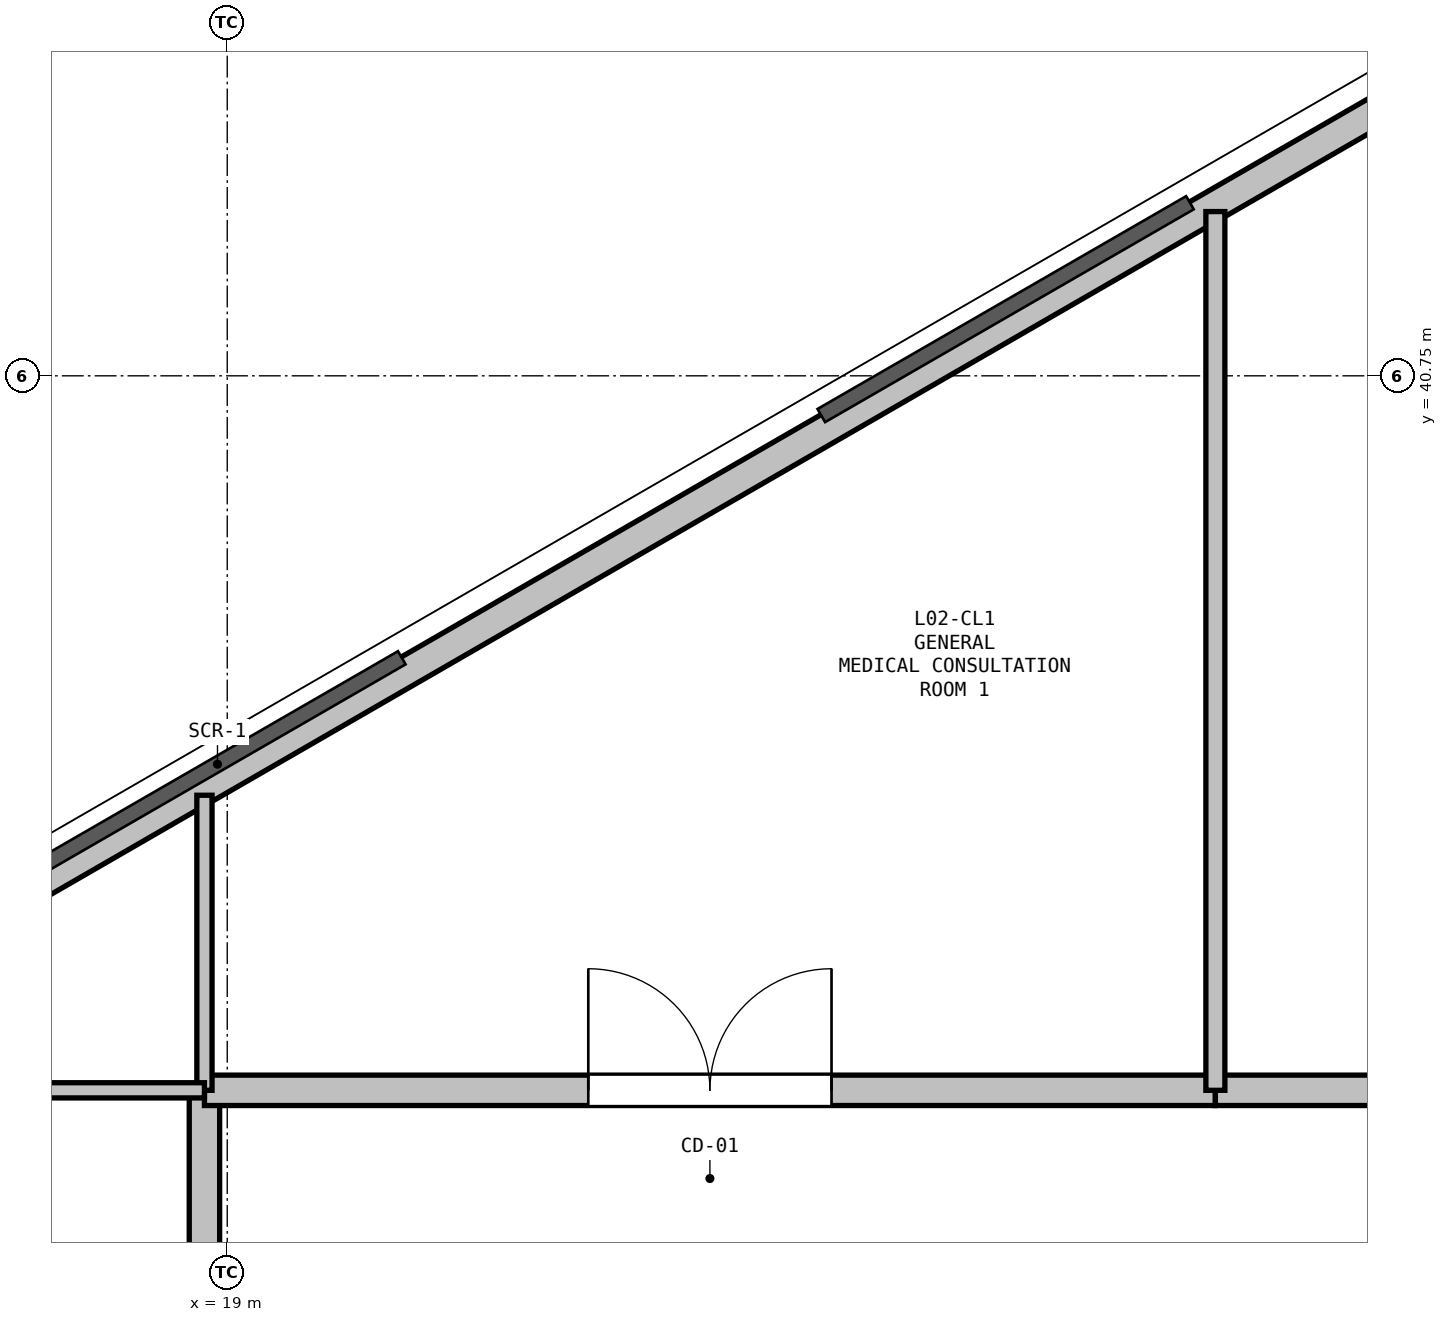
"""IFC4 building model, lengths in metres.
Left out: names, types, materials, properties, quantities, classifications, styles, units other than length and angle.
Written with IfcOpenShell. Run it as: python <this file> out.ifc"""

import sys

from ifc_helpers import new_model, si_unit, direction, frame, frame_2d, origin, place, context, subcontext, project, spatial, rectangle, extrude, element, fill, save


model = new_model("IFC4")
c1 = context("Model", 3, precision=1e-05, world=origin(), true_north=direction((0.0, 1.0)))
c2 = subcontext(c1, "Body", "Model", "MODEL_VIEW")
j1 = project(units=[si_unit("LENGTHUNIT", "METRE"), si_unit("PLANEANGLEUNIT", "RADIAN")], contexts=[c1])
p1 = place(None, origin())
s1 = spatial("IfcSite", under=j1, at=p1, CompositionType="ELEMENT")
p2 = place(p1, origin())
s2 = spatial("IfcBuilding", under=s1, at=p2, CompositionType="ELEMENT")
p3 = place(p2, frame((0.0, 0.0, 9.6)))
s3 = spatial("IfcBuildingStorey", under=s2, at=p3, CompositionType="ELEMENT", Elevation=9.6)
p4 = place(p3, frame((16.39, 36.617, 0.0), z_axis=(0.0, 0.0, 1.0), x_axis=(0.866027351828, 0.499996625875, 0.0)))
e1 = element("IfcWall", 1, at=p4, inside=s3, PredefinedType="PARAPET", context=c2, shape_type="SweptSolid", body=[
    extrude(rectangle(XDim=11.973, YDim=0.2, at=frame_2d((5.987, 0.0))), origin(), (0.0, 0.0, 1.0), 0.2),
])
p5 = place(p3, frame((18.85, 27.2, 0.0), z_axis=(0.0, 0.0, 1.0), x_axis=(0.0, 1.0, 0.0)))
e2 = element("IfcWall", 2, at=p5, inside=s3, PredefinedType="PARTITIONING", context=c2, shape_type="SweptSolid", body=[
    extrude(rectangle(XDim=8.85, YDim=0.2, at=frame_2d((4.425, 0.0))), origin(), (0.0, 0.0, 1.0), 3.777),
])
p6 = place(p5, frame((3.925, 0.0, 0.0)))
e3 = element("IfcOpeningElement", 3, at=p6, cuts=e2, PredefinedType="OPENING", context=c2, shape_type="SweptSolid", body=[
    extrude(rectangle(XDim=1.0, YDim=2.15, at=frame_2d((0.5, 1.075))), frame((0.0, 0.11, 0.0), z_axis=(0.0, -1.0, 0.0), x_axis=(1.0, 0.0, 0.0)), (0.0, 0.0, 1.0), 0.22),
])
p7 = place(p3, frame((18.85, 36.05, 0.0), z_axis=(0.0, 0.0, 1.0), x_axis=(1.0, 0.0, 0.0)))
e4 = element("IfcWall", 4, at=p7, inside=s3, PredefinedType="PARTITIONING", context=c2, shape_type="SweptSolid", body=[
    extrude(rectangle(XDim=6.65, YDim=0.2, at=frame_2d((3.325, 0.0))), origin(), (0.0, 0.0, 1.0), 4.48),
])
p8 = place(p7, frame((2.525, 0.0, 0.0)))
e5 = element("IfcOpeningElement", 5, at=p8, cuts=e4, PredefinedType="OPENING", context=c2, shape_type="SweptSolid", body=[
    extrude(rectangle(XDim=1.6, YDim=2.2, at=frame_2d((0.8, 1.1))), frame((0.0, 0.11, 0.0), z_axis=(0.0, -1.0, 0.0), x_axis=(1.0, 0.0, 0.0)), (0.0, 0.0, 1.0), 0.22),
])
p9 = place(p3, frame((25.5, 36.05, 0.0), z_axis=(0.0, 0.0, 1.0), x_axis=(1.0, 0.0, 0.0)))
e6 = element("IfcWall", 6, at=p9, inside=s3, PredefinedType="PARTITIONING", context=c2, shape_type="SweptSolid", body=[
    extrude(rectangle(XDim=6.7, YDim=0.2, at=frame_2d((3.35, 0.0))), origin(), (0.0, 0.0, 1.0), 4.48),
])
p10 = place(p9, frame((2.55, 0.0, 0.0)))
e7 = element("IfcOpeningElement", 7, at=p10, cuts=e6, PredefinedType="OPENING", context=c2, shape_type="SweptSolid", body=[
    extrude(rectangle(XDim=1.6, YDim=2.2, at=frame_2d((0.8, 1.1))), frame((0.0, 0.11, 0.0), z_axis=(0.0, -1.0, 0.0), x_axis=(1.0, 0.0, 0.0)), (0.0, 0.0, 1.0), 0.22),
])
p11 = place(p3, frame((18.85, 36.05, 0.0), z_axis=(0.0, 0.0, 1.0), x_axis=(0.0, 1.0, 0.0)))
e8 = element("IfcWall", 8, at=p11, inside=s3, PredefinedType="PARTITIONING", context=c2, shape_type="SweptSolid", body=[
    extrude(rectangle(XDim=1.941, YDim=0.1, at=frame_2d((0.97, 0.0))), origin(), (0.0, 0.0, 1.0), 4.09),
])
p12 = place(p3, frame((25.5, 41.83, 0.0), z_axis=(0.0, 0.0, 1.0), x_axis=(0.0, -1.0, 0.0)))
e9 = element("IfcWall", 9, at=p12, inside=s3, PredefinedType="PARTITIONING", context=c2, shape_type="SweptSolid", body=[
    extrude(rectangle(XDim=5.78, YDim=0.125, at=frame_2d((2.89, 0.0))), origin(), (0.0, 0.0, 1.0), 4.09),
])
p13 = place(p3, frame((15.993, 36.05, 0.0), z_axis=(0.0, 0.0, 1.0), x_axis=(1.0, 0.0, 0.0)))
e10 = element("IfcWall", 10, at=p13, inside=s3, PredefinedType="PARTITIONING", context=c2, shape_type="SweptSolid", body=[
    extrude(rectangle(XDim=2.857, YDim=0.1, at=frame_2d((1.428, 0.0))), origin(), (0.0, 0.0, 1.0), 4.09),
])
p14 = place(p8, origin())
e11 = element("IfcDoor", 11, at=p14, inside=s3, OperationType="DOUBLE_DOOR_SINGLE_SWING", PredefinedType="DOOR", context=c2, shape_type="SweptSolid", body=[
    extrude(rectangle(XDim=1.6, YDim=2.2, at=frame_2d((0.8, 1.1))), frame((0.0, 0.025, 0.0), z_axis=(0.0, -1.0, 0.0), x_axis=(1.0, 0.0, 0.0)), (0.0, 0.0, 1.0), 0.05),
])
fill(e5, e11)
save(model, sys.argv[1])
